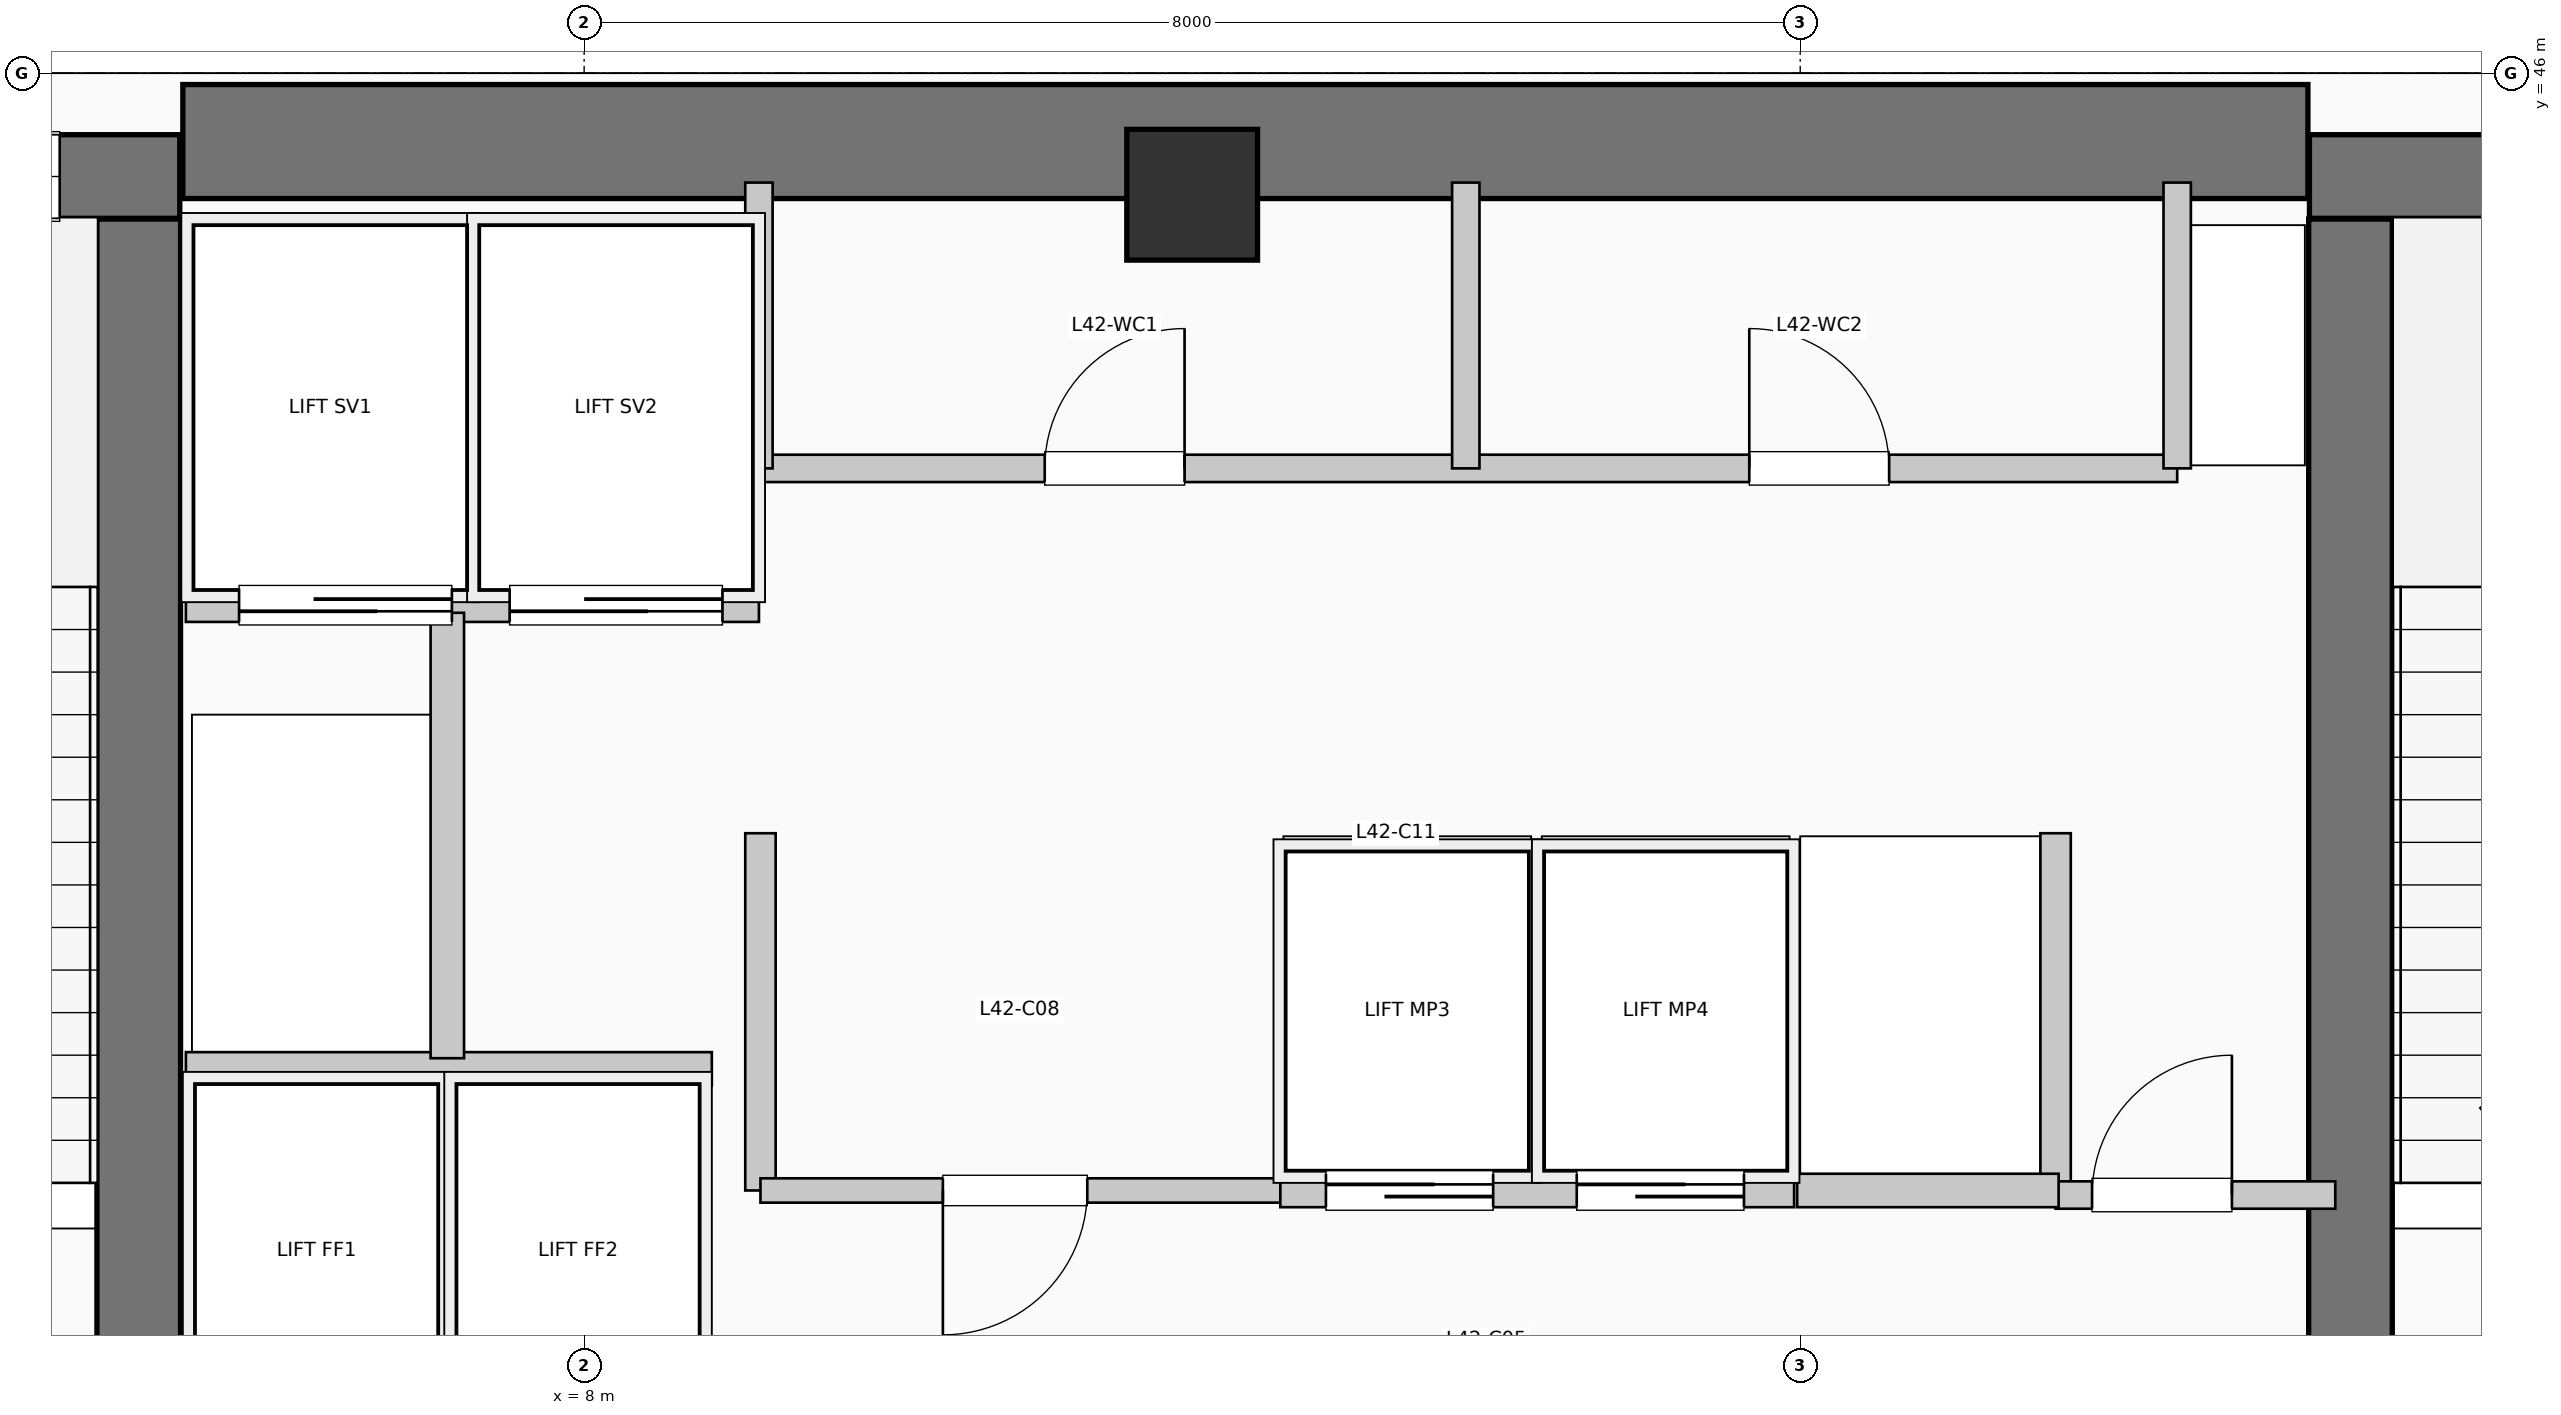
"""IFC4 building model, lengths in metres.
Left out: names, types, materials, properties, quantities, classifications, styles, units other than length and angle.
Written with IfcOpenShell. Run it as: python <this file> out.ifc"""

import sys

from ifc_helpers import new_model, si_unit, direction, frame, frame_2d, origin, origin_2d, place, context, subcontext, project, spatial, rectangle, extrude, element, fill, save


model = new_model("IFC4")
c1 = context("Model", 3, precision=1e-05, world=origin(), true_north=direction((0.0, 1.0)))
c2 = subcontext(c1, "Body", "Model", "MODEL_VIEW")
j1 = project(units=[si_unit("LENGTHUNIT", "METRE"), si_unit("PLANEANGLEUNIT", "RADIAN")], contexts=[c1])
p1 = place(None, origin())
s1 = spatial("IfcSite", under=j1, at=p1, CompositionType="ELEMENT")
p2 = place(p1, origin())
s2 = spatial("IfcBuilding", under=s1, at=p2, CompositionType="ELEMENT")
p3 = place(p2, frame((0.0, 0.0, 174.57)))
s3 = spatial("IfcBuildingStorey", under=s2, at=p3, CompositionType="ELEMENT", Elevation=174.57)
p4 = place(p3, frame((5.36, 45.55, 0.0), z_axis=(0.0, 0.0, 1.0), x_axis=(1.0, 0.0, 0.0)))
e1 = element("IfcWall", 1, at=p4, inside=s3, PredefinedType="SHEAR", context=c2, shape_type="SweptSolid", body=[
    extrude(rectangle(XDim=13.98, YDim=0.75, at=frame_2d((6.99, 0.0))), origin(), (0.0, 0.0, 1.0), 4.95),
])
p5 = place(p3, frame((5.07, 37.15, 0.0), z_axis=(0.0, 0.0, 1.0), x_axis=(0.0, 1.0, 0.0)))
e2 = element("IfcWall", 2, at=p5, inside=s3, PredefinedType="SHEAR", context=c2, shape_type="SweptSolid", body=[
    extrude(rectangle(XDim=7.89, YDim=0.55, at=frame_2d((3.945, 0.0))), origin(), (0.0, 0.0, 1.0), 4.95),
])
p6 = place(p3, frame((1.1, 45.32, 0.0), z_axis=(0.0, 0.0, 1.0), x_axis=(1.0, 0.0, 0.0)))
e3 = element("IfcWall", 3, at=p6, inside=s3, PredefinedType="SHEAR", context=c2, shape_type="SweptSolid", body=[
    extrude(rectangle(XDim=4.24, YDim=0.55, at=frame_2d((2.12, 0.0))), origin(), (0.0, 0.0, 1.0), 4.95),
])
p7 = place(p6, frame((2.05, 0.0, 1.05)))
e4 = element("IfcOpeningElement", 4, at=p7, cuts=e3, PredefinedType="OPENING", context=c2, shape_type="SweptSolid", body=[
    extrude(rectangle(XDim=1.4, YDim=1.8, at=frame_2d((0.7, 0.9))), frame((0.0, 0.285, 0.0), z_axis=(0.0, -1.0, 0.0), x_axis=(1.0, 0.0, 0.0)), (0.0, 0.0, 1.0), 0.57),
])
p8 = place(p3, frame((19.62, 37.15, 0.0), z_axis=(0.0, 0.0, 1.0), x_axis=(0.0, 1.0, 0.0)))
e5 = element("IfcWall", 5, at=p8, inside=s3, PredefinedType="SHEAR", context=c2, shape_type="SweptSolid", body=[
    extrude(rectangle(XDim=7.89, YDim=0.55, at=frame_2d((3.945, 0.0))), origin(), (0.0, 0.0, 1.0), 4.95),
])
p9 = place(p3, frame((19.35, 45.32, 0.0), z_axis=(0.0, 0.0, 1.0), x_axis=(1.0, 0.0, 0.0)))
e6 = element("IfcWall", 6, at=p9, inside=s3, PredefinedType="SHEAR", context=c2, shape_type="SweptSolid", body=[
    extrude(rectangle(XDim=3.69, YDim=0.55, at=frame_2d((1.845, 0.0))), origin(), (0.0, 0.0, 1.0), 4.95),
])
p10 = place(p9, frame((1.15, 0.0, 1.05)))
e7 = element("IfcOpeningElement", 7, at=p10, cuts=e6, PredefinedType="OPENING", context=c2, shape_type="SweptSolid", body=[
    extrude(rectangle(XDim=1.4, YDim=1.8, at=frame_2d((0.7, 0.9))), frame((0.0, 0.285, 0.0), z_axis=(0.0, -1.0, 0.0), x_axis=(1.0, 0.0, 0.0)), (0.0, 0.0, 1.0), 0.57),
])
p11 = place(p3, frame((12.0, 45.2, 0.0), z_axis=(0.0, 0.0, 1.0), x_axis=(1.0, 0.0, 0.0)))
e8 = element("IfcColumn", 8, at=p11, inside=s3, PredefinedType="COLUMN", context=c2, shape_type="SweptSolid", body=[
    extrude(rectangle(XDim=0.86, YDim=0.86, at=origin_2d()), origin(), (0.0, 0.0, 1.0), 4.95),
])
p12 = place(p3, frame((5.38, 39.45, 0.0), z_axis=(0.0, 0.0, 1.0), x_axis=(1.0, 0.0, 0.0)))
e9 = element("IfcWall", 9, at=p12, inside=s3, PredefinedType="PARTITIONING", context=c2, shape_type="SweptSolid", body=[
    extrude(rectangle(XDim=3.46, YDim=0.22, at=frame_2d((1.73, 0.0))), origin(), (0.0, 0.0, 1.0), 4.7),
])
p13 = place(p3, frame((5.38, 42.5, 0.0), z_axis=(0.0, 0.0, 1.0), x_axis=(1.0, 0.0, 0.0)))
e10 = element("IfcWall", 10, at=p13, inside=s3, PredefinedType="PARTITIONING", context=c2, shape_type="SweptSolid", body=[
    extrude(rectangle(XDim=3.77, YDim=0.22, at=frame_2d((1.885, 0.0))), origin(), (0.0, 0.0, 1.0), 4.7),
])
p14 = place(p13, frame((1.75, 0.0, 0.0), z_axis=(0.0, 0.0, 1.0), x_axis=(-1.0, 0.0, 0.0)))
e11 = element("IfcOpeningElement", 11, at=p14, cuts=e10, PredefinedType="OPENING", context=c2, shape_type="SweptSolid", body=[
    extrude(rectangle(XDim=1.4, YDim=2.2, at=frame_2d((0.7, 1.1))), frame((0.0, 0.12, 0.0), z_axis=(0.0, -1.0, 0.0), x_axis=(1.0, 0.0, 0.0)), (0.0, 0.0, 1.0), 0.24),
])
p15 = place(p13, frame((3.53, 0.0, 0.0), z_axis=(0.0, 0.0, 1.0), x_axis=(-1.0, 0.0, 0.0)))
e12 = element("IfcOpeningElement", 12, at=p15, cuts=e10, PredefinedType="OPENING", context=c2, shape_type="SweptSolid", body=[
    extrude(rectangle(XDim=1.4, YDim=2.2, at=frame_2d((0.7, 1.1))), frame((0.0, 0.12, 0.0), z_axis=(0.0, -1.0, 0.0), x_axis=(1.0, 0.0, 0.0)), (0.0, 0.0, 1.0), 0.24),
])
p16 = place(p3, frame((7.1, 39.52, 0.0), z_axis=(0.0, 0.0, 1.0), x_axis=(0.0, 1.0, 0.0)))
e13 = element("IfcWall", 13, at=p16, inside=s3, PredefinedType="PARTITIONING", context=c2, shape_type="SweptSolid", body=[
    extrude(rectangle(XDim=2.93, YDim=0.22, at=frame_2d((1.465, 0.0))), origin(), (0.0, 0.0, 1.0), 4.7),
])
for number, where, z_axis, x_axis in (
    (14, (9.16, 38.65, 0.0), (0.0, 0.0, 1.0), (0.0, 1.0, 0.0)),
    (15, (17.68, 38.65, 0.0), (0.0, 0.0, 1.0), (0.0, 1.0, 0.0)),
):
    element("IfcWall", number, at=place(p3, frame(where, z_axis=z_axis, x_axis=x_axis)), inside=s3, PredefinedType="PARTITIONING", context=c2, shape_type="SweptSolid", body=[
        extrude(rectangle(XDim=2.35, YDim=0.2, at=frame_2d((1.175, 0.0))), origin(), (0.0, 0.0, 1.0), 4.7),
    ])
p17 = place(p3, frame((17.68, 38.62, 0.0), z_axis=(0.0, 0.0, 1.0), x_axis=(1.0, 0.0, 0.0)))
e16 = element("IfcWall", 16, at=p17, inside=s3, PredefinedType="PARTITIONING", context=c2, shape_type="SweptSolid", body=[
    extrude(rectangle(XDim=1.84, YDim=0.18, at=frame_2d((0.92, 0.0))), origin(), (0.0, 0.0, 1.0), 4.7),
])
p18 = place(p17, frame((0.24, 0.0, 0.0)))
e17 = element("IfcOpeningElement", 17, at=p18, cuts=e16, PredefinedType="OPENING", context=c2, shape_type="SweptSolid", body=[
    extrude(rectangle(XDim=0.92, YDim=2.1, at=frame_2d((0.46, 1.05))), frame((0.0, 0.1, 0.0), z_axis=(0.0, -1.0, 0.0), x_axis=(1.0, 0.0, 0.0)), (0.0, 0.0, 1.0), 0.2),
])
p19 = place(p3, frame((9.16, 38.65, 0.0), z_axis=(0.0, 0.0, 1.0), x_axis=(1.0, 0.0, 0.0)))
e18 = element("IfcWall", 18, at=p19, inside=s3, PredefinedType="PARTITIONING", context=c2, shape_type="SweptSolid", body=[
    extrude(rectangle(XDim=3.42, YDim=0.16, at=frame_2d((1.71, 0.0))), origin(), (0.0, 0.0, 1.0), 4.7),
])
p20 = place(p19, frame((2.15, 0.0, 0.0), z_axis=(0.0, 0.0, 1.0), x_axis=(-1.0, 0.0, 0.0)))
e19 = element("IfcOpeningElement", 19, at=p20, cuts=e18, PredefinedType="OPENING", context=c2, shape_type="SweptSolid", body=[
    extrude(rectangle(XDim=0.95, YDim=2.15, at=frame_2d((0.475, 1.075))), frame((0.0, 0.09, 0.0), z_axis=(0.0, -1.0, 0.0), x_axis=(1.0, 0.0, 0.0)), (0.0, 0.0, 1.0), 0.18),
])
p21 = place(p3, frame((12.58, 38.65, 0.0), z_axis=(0.0, 0.0, 1.0), x_axis=(1.0, 0.0, 0.0)))
e20 = element("IfcWall", 20, at=p21, inside=s3, PredefinedType="PARTITIONING", context=c2, shape_type="SweptSolid", body=[
    extrude(rectangle(XDim=3.38, YDim=0.22, at=frame_2d((1.69, 0.0))), origin(), (0.0, 0.0, 1.0), 4.7),
])
p22 = place(p21, frame((0.3, 0.0, 0.0)))
e21 = element("IfcOpeningElement", 21, at=p22, cuts=e20, PredefinedType="OPENING", context=c2, shape_type="SweptSolid", body=[
    extrude(rectangle(XDim=1.1, YDim=2.2, at=frame_2d((0.55, 1.1))), frame((0.0, 0.12, 0.0), z_axis=(0.0, -1.0, 0.0), x_axis=(1.0, 0.0, 0.0)), (0.0, 0.0, 1.0), 0.24),
])
p23 = place(p21, frame((1.95, 0.0, 0.0)))
e22 = element("IfcOpeningElement", 22, at=p23, cuts=e20, PredefinedType="OPENING", context=c2, shape_type="SweptSolid", body=[
    extrude(rectangle(XDim=1.1, YDim=2.2, at=frame_2d((0.55, 1.1))), frame((0.0, 0.12, 0.0), z_axis=(0.0, -1.0, 0.0), x_axis=(1.0, 0.0, 0.0)), (0.0, 0.0, 1.0), 0.24),
])
p24 = place(p3, frame((15.98, 38.65, 0.0), z_axis=(0.0, 0.0, 1.0), x_axis=(1.0, 0.0, 0.0)))
e23 = element("IfcWall", 23, at=p24, inside=s3, PredefinedType="PARTITIONING", context=c2, shape_type="SweptSolid", body=[
    extrude(rectangle(XDim=1.72, YDim=0.22, at=frame_2d((0.86, 0.0))), origin(), (0.0, 0.0, 1.0), 4.7),
])
p25 = place(p3, frame((9.15, 43.4, 0.0), z_axis=(0.0, 0.0, 1.0), x_axis=(1.0, 0.0, 0.0)))
e24 = element("IfcWall", 24, at=p25, inside=s3, PredefinedType="PLUMBINGWALL", context=c2, shape_type="SweptSolid", body=[
    extrude(rectangle(XDim=9.33, YDim=0.18, at=frame_2d((4.665, 0.0))), origin(), (0.0, 0.0, 1.0), 4.7),
])
p26 = place(p25, frame((1.88, 0.0, 0.0)))
e25 = element("IfcOpeningElement", 25, at=p26, cuts=e24, PredefinedType="OPENING", context=c2, shape_type="SweptSolid", body=[
    extrude(rectangle(XDim=0.92, YDim=2.1, at=frame_2d((0.46, 1.05))), frame((0.0, 0.1, 0.0), z_axis=(0.0, -1.0, 0.0), x_axis=(1.0, 0.0, 0.0)), (0.0, 0.0, 1.0), 0.2),
])
p27 = place(p25, frame((6.515, 0.0, 0.0)))
e26 = element("IfcOpeningElement", 26, at=p27, cuts=e24, PredefinedType="OPENING", context=c2, shape_type="SweptSolid", body=[
    extrude(rectangle(XDim=0.92, YDim=2.1, at=frame_2d((0.46, 1.05))), frame((0.0, 0.1, 0.0), z_axis=(0.0, -1.0, 0.0), x_axis=(1.0, 0.0, 0.0)), (0.0, 0.0, 1.0), 0.2),
])
for number, where, z_axis, x_axis in (
    (27, (9.15, 43.4, 0.0), (0.0, 0.0, 1.0), (0.0, 1.0, 0.0)),
    (28, (18.48, 43.4, 0.0), (0.0, 0.0, 1.0), (0.0, 1.0, 0.0)),
    (29, (13.8, 43.4, 0.0), (0.0, 0.0, 1.0), (0.0, 1.0, 0.0)),
):
    element("IfcWall", number, at=place(p3, frame(where, z_axis=z_axis, x_axis=x_axis)), inside=s3, PredefinedType="PLUMBINGWALL", context=c2, shape_type="SweptSolid", body=[
        extrude(rectangle(XDim=1.88, YDim=0.18, at=frame_2d((0.94, 0.0))), origin(), (0.0, 0.0, 1.0), 4.7),
    ])
p28 = place(p7, origin())
e30 = element("IfcWindow", 30, at=p28, inside=s3, PartitioningType="SINGLE_PANEL", PredefinedType="WINDOW", context=c2, shape_type="SweptSolid", body=[
    extrude(rectangle(XDim=1.4, YDim=1.8, at=frame_2d((0.7, 0.9))), frame((0.0, 0.03, 0.0), z_axis=(0.0, -1.0, 0.0), x_axis=(1.0, 0.0, 0.0)), (0.0, 0.0, 1.0), 0.06),
])
fill(e4, e30)
p29 = place(p14, origin())
e31 = element("IfcDoor", 31, at=p29, inside=s3, OperationType="SLIDING_TO_LEFT", PredefinedType="DOOR", context=c2, shape_type="SweptSolid", body=[
    extrude(rectangle(XDim=1.4, YDim=2.2, at=frame_2d((0.7, 1.1))), frame((0.0, 0.025, 0.0), z_axis=(0.0, -1.0, 0.0), x_axis=(1.0, 0.0, 0.0)), (0.0, 0.0, 1.0), 0.05),
])
fill(e11, e31)
p30 = place(p15, origin())
e32 = element("IfcDoor", 32, at=p30, inside=s3, OperationType="SLIDING_TO_LEFT", PredefinedType="DOOR", context=c2, shape_type="SweptSolid", body=[
    extrude(rectangle(XDim=1.4, YDim=2.2, at=frame_2d((0.7, 1.1))), frame((0.0, 0.025, 0.0), z_axis=(0.0, -1.0, 0.0), x_axis=(1.0, 0.0, 0.0)), (0.0, 0.0, 1.0), 0.05),
])
fill(e12, e32)
p31 = place(p18, origin())
e33 = element("IfcDoor", 33, at=p31, inside=s3, OperationType="SINGLE_SWING_RIGHT", PredefinedType="DOOR", context=c2, shape_type="SweptSolid", body=[
    extrude(rectangle(XDim=0.92, YDim=2.1, at=frame_2d((0.46, 1.05))), frame((0.0, 0.025, 0.0), z_axis=(0.0, -1.0, 0.0), x_axis=(1.0, 0.0, 0.0)), (0.0, 0.0, 1.0), 0.05),
])
fill(e17, e33)
p32 = place(p20, origin())
e34 = element("IfcDoor", 34, at=p32, inside=s3, OperationType="SINGLE_SWING_LEFT", PredefinedType="DOOR", context=c2, shape_type="SweptSolid", body=[
    extrude(rectangle(XDim=0.95, YDim=2.15, at=frame_2d((0.475, 1.075))), frame((0.0, 0.025, 0.0), z_axis=(0.0, -1.0, 0.0), x_axis=(1.0, 0.0, 0.0)), (0.0, 0.0, 1.0), 0.05),
])
fill(e19, e34)
p33 = place(p22, origin())
e35 = element("IfcDoor", 35, at=p33, inside=s3, OperationType="SLIDING_TO_RIGHT", PredefinedType="DOOR", context=c2, shape_type="SweptSolid", body=[
    extrude(rectangle(XDim=1.1, YDim=2.2, at=frame_2d((0.55, 1.1))), frame((0.0, 0.025, 0.0), z_axis=(0.0, -1.0, 0.0), x_axis=(1.0, 0.0, 0.0)), (0.0, 0.0, 1.0), 0.05),
])
fill(e21, e35)
p34 = place(p23, origin())
e36 = element("IfcDoor", 36, at=p34, inside=s3, OperationType="SLIDING_TO_RIGHT", PredefinedType="DOOR", context=c2, shape_type="SweptSolid", body=[
    extrude(rectangle(XDim=1.1, YDim=2.2, at=frame_2d((0.55, 1.1))), frame((0.0, 0.025, 0.0), z_axis=(0.0, -1.0, 0.0), x_axis=(1.0, 0.0, 0.0)), (0.0, 0.0, 1.0), 0.05),
])
fill(e22, e36)
p35 = place(p26, origin())
e37 = element("IfcDoor", 37, at=p35, inside=s3, OperationType="SINGLE_SWING_RIGHT", PredefinedType="DOOR", context=c2, shape_type="SweptSolid", body=[
    extrude(rectangle(XDim=0.92, YDim=2.1, at=frame_2d((0.46, 1.05))), frame((0.0, 0.025, 0.0), z_axis=(0.0, -1.0, 0.0), x_axis=(1.0, 0.0, 0.0)), (0.0, 0.0, 1.0), 0.05),
])
fill(e25, e37)
p36 = place(p27, origin())
e38 = element("IfcDoor", 38, at=p36, inside=s3, OperationType="SINGLE_SWING_LEFT", PredefinedType="DOOR", context=c2, shape_type="SweptSolid", body=[
    extrude(rectangle(XDim=0.92, YDim=2.1, at=frame_2d((0.46, 1.05))), frame((0.0, 0.025, 0.0), z_axis=(0.0, -1.0, 0.0), x_axis=(1.0, 0.0, 0.0)), (0.0, 0.0, 1.0), 0.05),
])
fill(e26, e38)
save(model, sys.argv[1])
